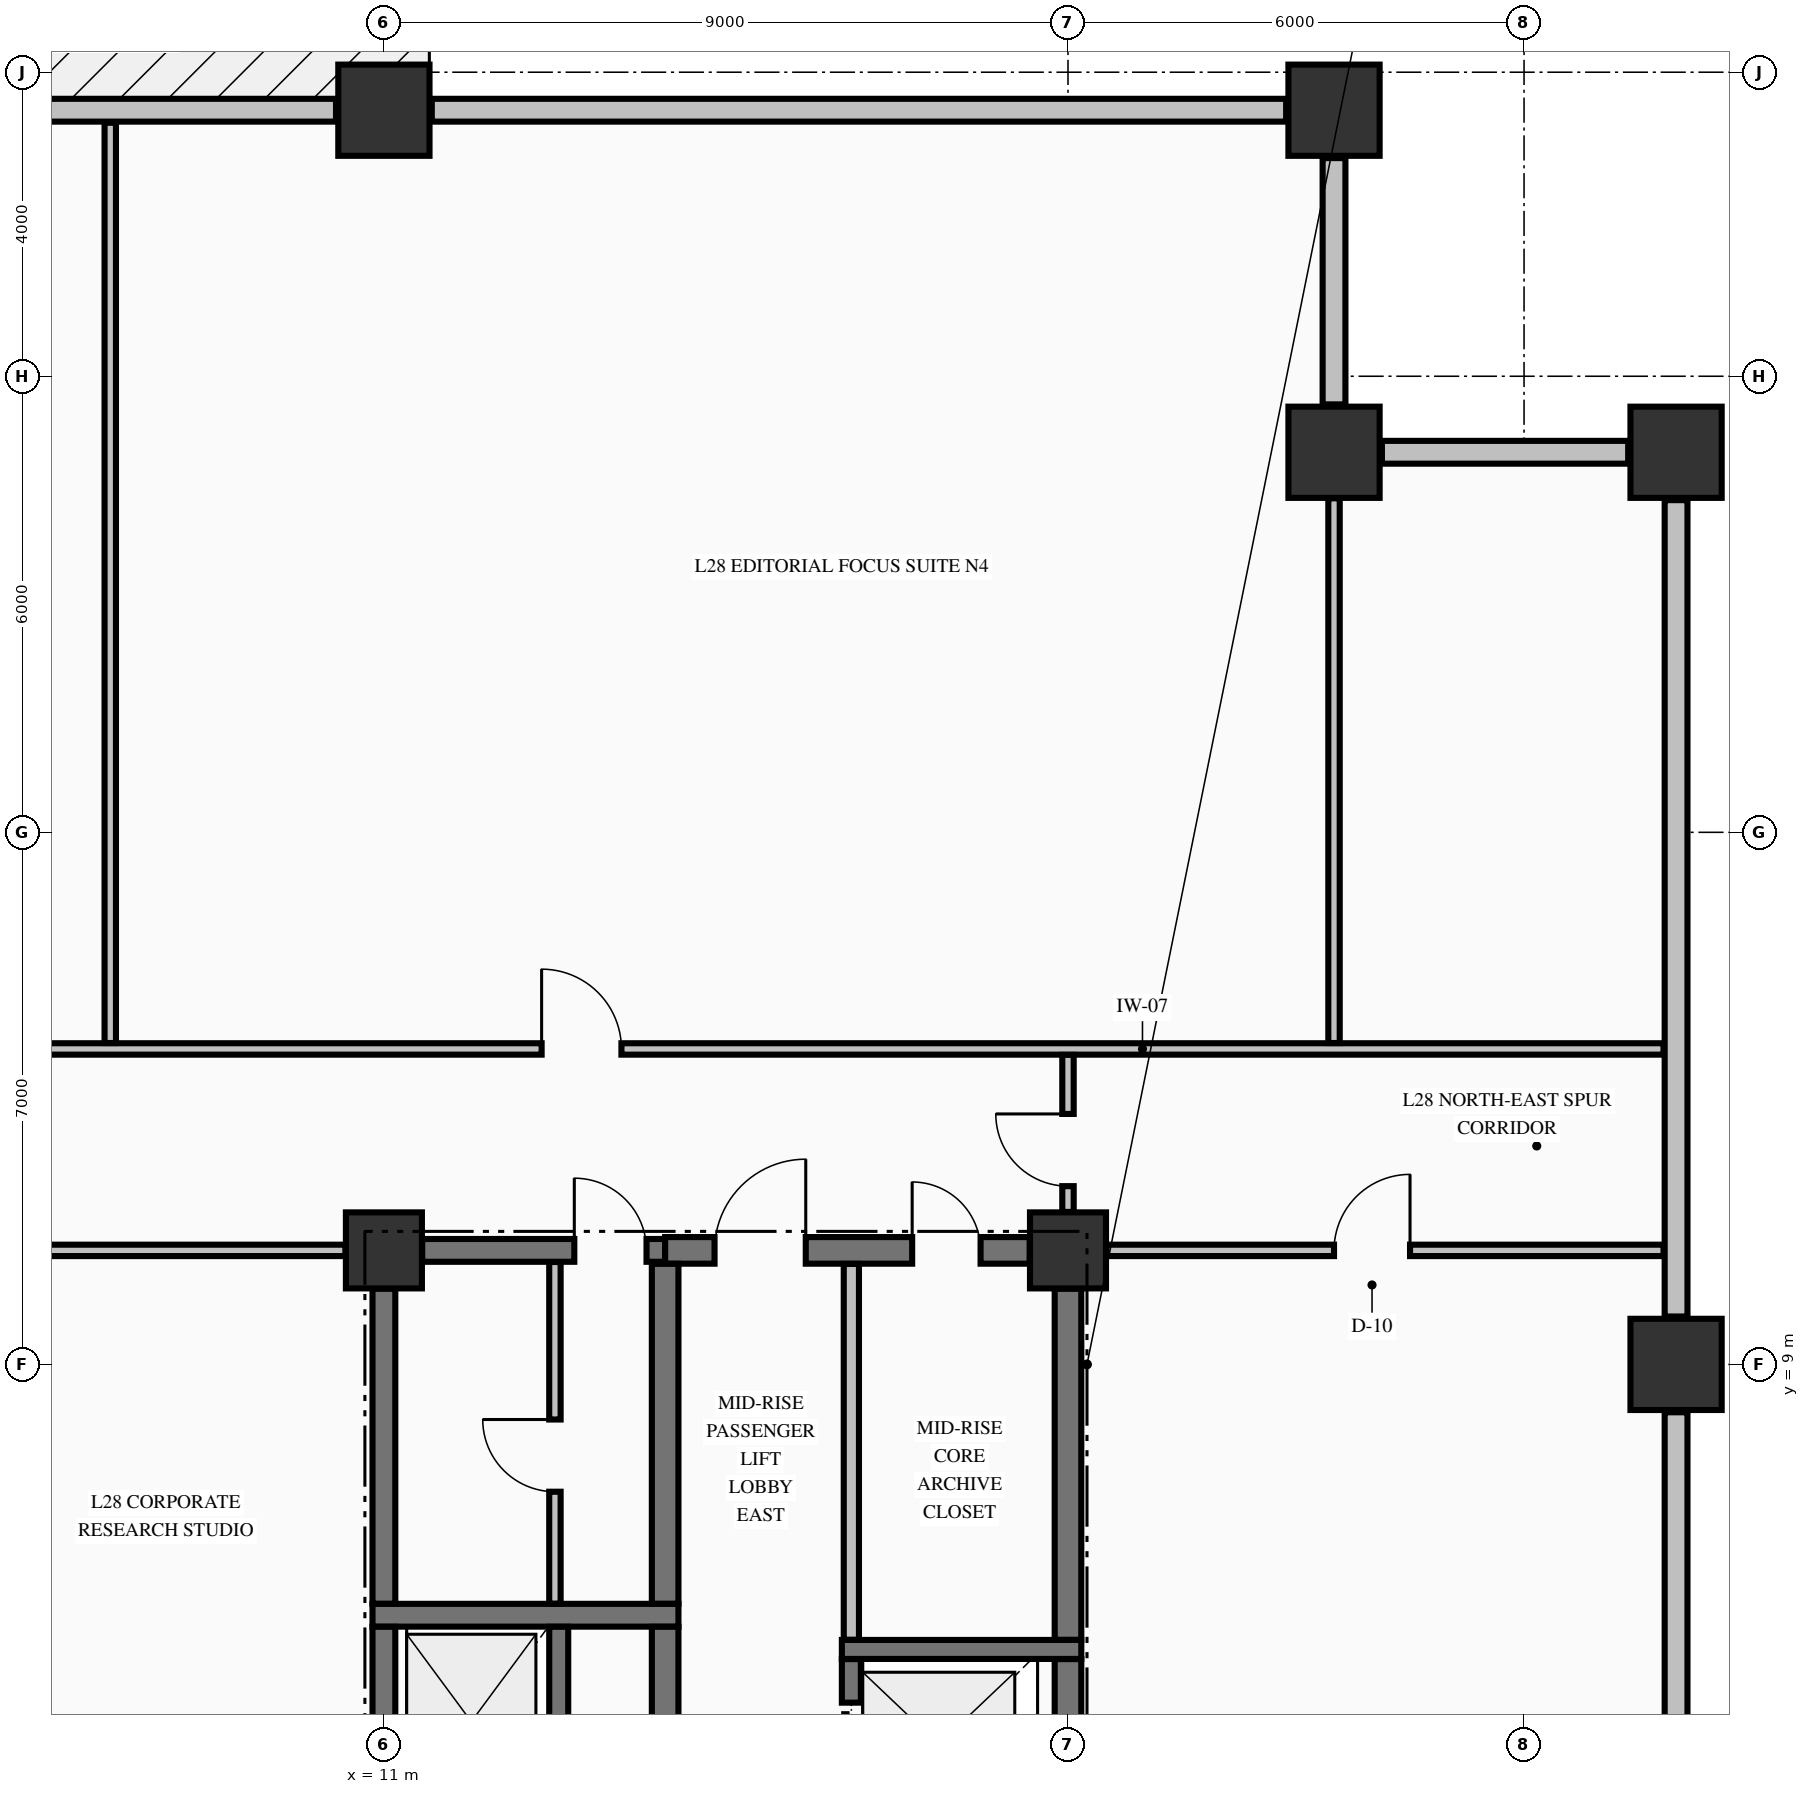
"""IFC4 building model, lengths in metres.
Left out: names, types, materials, properties, quantities, classifications, styles, units other than length and angle.
Written with IfcOpenShell. Run it as: python <this file> out.ifc"""

import sys

from ifc_helpers import new_model, si_unit, direction, frame, frame_2d, origin, origin_2d, place, context, subcontext, project, spatial, rectangle, extrude, element, fill, save


model = new_model("IFC4")
c1 = context("Model", 3, precision=1e-05, world=origin(), true_north=direction((0.0, 1.0)))
c2 = subcontext(c1, "Body", "Model", "MODEL_VIEW")
j1 = project(units=[si_unit("LENGTHUNIT", "METRE"), si_unit("PLANEANGLEUNIT", "RADIAN")], contexts=[c1])
p1 = place(None, origin())
s1 = spatial("IfcSite", under=j1, at=p1, CompositionType="ELEMENT")
p2 = place(p1, origin())
s2 = spatial("IfcBuilding", under=s1, at=p2, CompositionType="ELEMENT")
p3 = place(p2, frame((0.0, 0.0, 112.78)))
s3 = spatial("IfcBuildingStorey", under=s2, at=p3, CompositionType="ELEMENT", Elevation=112.78)
for number, where, z_axis, x_axis in (
    (1, (11.0, 25.5, -0.25), (0.0, 0.0, 1.0), (1.0, 0.0, 0.0)),
    (2, (23.5, 25.5, -0.25), (0.0, 0.0, 1.0), (1.0, 0.0, 0.0)),
    (3, (28.0, 9.0, -0.25), (0.0, 0.0, 1.0), (1.0, 0.0, 0.0)),
    (4, (28.0, 21.0, -0.25), (0.0, 0.0, 1.0), (1.0, 0.0, 0.0)),
    (5, (23.5, 21.0, -0.25), (0.0, 0.0, 1.0), (1.0, 0.0, 0.0)),
):
    element("IfcColumn", number, at=place(p3, frame(where, z_axis=z_axis, x_axis=x_axis)), inside=s3, PredefinedType="COLUMN", context=c2, shape_type="SweptSolid", body=[
        extrude(rectangle(XDim=1.2, YDim=1.2, at=origin_2d()), origin(), (0.0, 0.0, 1.0), 3.395),
    ])
for number, where, z_axis, x_axis in (
    (6, (11.0, 10.5, -0.25), (0.0, 0.0, 1.0), (1.0, 0.0, 0.0)),
    (7, (20.0, 10.5, -0.25), (0.0, 0.0, 1.0), (1.0, 0.0, 0.0)),
):
    element("IfcColumn", number, at=place(p3, frame(where, z_axis=z_axis, x_axis=x_axis)), inside=s3, PredefinedType="COLUMN", context=c2, shape_type="SweptSolid", body=[
        extrude(rectangle(XDim=1.0, YDim=1.0, at=origin_2d()), origin(), (0.0, 0.0, 1.0), 3.395),
    ])
for number, where, z_axis, x_axis in (
    (8, (27.37, 21.0, 0.0), (0.0, 0.0, 1.0), (-1.0, 0.0, 0.0)),
    (9, (23.5, 21.63, 0.0), (0.0, 0.0, 1.0), (0.0, 1.0, 0.0)),
):
    element("IfcWall", number, at=place(p3, frame(where, z_axis=z_axis, x_axis=x_axis)), inside=s3, PredefinedType="STANDARD", context=c2, shape_type="SweptSolid", body=[
        extrude(rectangle(XDim=3.24, YDim=0.3, at=frame_2d((1.62, 0.0))), origin(), (0.0, 0.0, 1.0), 2.537),
    ])
p4 = place(p3, frame((10.37, 25.5, 0.0), z_axis=(0.0, 0.0, 1.0), x_axis=(-1.0, 0.0, 0.0)))
e10 = element("IfcWall", 10, at=p4, inside=s3, PredefinedType="STANDARD", context=c2, shape_type="SweptSolid", body=[
    extrude(rectangle(XDim=9.74, YDim=0.3, at=frame_2d((4.87, 0.0))), origin(), (0.0, 0.0, 1.0), 2.537),
])
p5 = place(p3, frame((22.87, 25.5, 0.0), z_axis=(0.0, 0.0, 1.0), x_axis=(-1.0, 0.0, 0.0)))
e11 = element("IfcWall", 11, at=p5, inside=s3, PredefinedType="STANDARD", context=c2, shape_type="SweptSolid", body=[
    extrude(rectangle(XDim=11.24, YDim=0.3, at=frame_2d((5.62, 0.0))), origin(), (0.0, 0.0, 1.0), 2.537),
])
p6 = place(p3, frame((28.0, 0.63, 0.0), z_axis=(0.0, 0.0, 1.0), x_axis=(0.0, 1.0, 0.0)))
e12 = element("IfcWall", 12, at=p6, inside=s3, PredefinedType="STANDARD", context=c2, shape_type="SweptSolid", body=[
    extrude(rectangle(XDim=7.74, YDim=0.3, at=frame_2d((3.87, 0.0))), origin(), (0.0, 0.0, 1.0), 2.537),
])
p7 = place(p3, frame((28.0, 9.63, 0.0), z_axis=(0.0, 0.0, 1.0), x_axis=(0.0, 1.0, 0.0)))
e13 = element("IfcWall", 13, at=p7, inside=s3, PredefinedType="STANDARD", context=c2, shape_type="SweptSolid", body=[
    extrude(rectangle(XDim=10.74, YDim=0.3, at=frame_2d((5.37, 0.0))), origin(), (0.0, 0.0, 1.0), 2.537),
])
p8 = place(p3, frame((17.025, 5.25, 0.0), z_axis=(0.0, 0.0, 1.0), x_axis=(1.0, 0.0, 0.0)))
e14 = element("IfcWall", 14, at=p8, inside=s3, PredefinedType="SOLIDWALL", context=c2, shape_type="SweptSolid", body=[
    extrude(rectangle(XDim=3.15, YDim=0.25, at=frame_2d((1.575, 0.0))), origin(), (0.0, 0.0, 1.0), 3.145),
])
p9 = place(p3, frame((10.85, 5.7, 0.0), z_axis=(0.0, 0.0, 1.0), x_axis=(1.0, 0.0, 0.0)))
e15 = element("IfcWall", 15, at=p9, inside=s3, PredefinedType="SHEAR", context=c2, shape_type="SweptSolid", body=[
    extrude(rectangle(XDim=4.025, YDim=0.3, at=frame_2d((2.012, 0.0))), origin(), (0.0, 0.0, 1.0), 3.145),
])
p10 = place(p3, frame((11.504, 10.5, 0.0), z_axis=(0.0, 0.0, 1.0), x_axis=(1.0, 0.0, 0.0)))
e16 = element("IfcWall", 16, at=p10, inside=s3, PredefinedType="SHEAR", context=c2, shape_type="SweptSolid", body=[
    extrude(rectangle(XDim=3.196, YDim=0.3, at=frame_2d((1.598, 0.0))), origin(), (0.0, 0.0, 1.0), 3.145),
])
p11 = place(p10, frame((2.001, 0.0, 0.0)))
e17 = element("IfcOpeningElement", 17, at=p11, cuts=e16, PredefinedType="OPENING", context=c2, shape_type="SweptSolid", body=[
    extrude(rectangle(XDim=0.95, YDim=2.15, at=frame_2d((0.475, 1.075))), frame((0.0, 0.16, 0.0), z_axis=(0.0, -1.0, 0.0), x_axis=(1.0, 0.0, 0.0)), (0.0, 0.0, 1.0), 0.32),
])
p12 = place(p3, frame((14.7, 10.5, 0.0), z_axis=(0.0, 0.0, 1.0), x_axis=(1.0, 0.0, 0.0)))
e18 = element("IfcWall", 18, at=p12, inside=s3, PredefinedType="SHEAR", context=c2, shape_type="SweptSolid", body=[
    extrude(rectangle(XDim=4.796, YDim=0.35, at=frame_2d((2.398, 0.0))), origin(), (0.0, 0.0, 1.0), 3.145),
])
p13 = place(p12, frame((0.65, 0.0, 0.0)))
e19 = element("IfcOpeningElement", 19, at=p13, cuts=e18, PredefinedType="OPENING", context=c2, shape_type="SweptSolid", body=[
    extrude(rectangle(XDim=1.2, YDim=2.15, at=frame_2d((0.6, 1.075))), frame((0.0, 0.185, 0.0), z_axis=(0.0, -1.0, 0.0), x_axis=(1.0, 0.0, 0.0)), (0.0, 0.0, 1.0), 0.37),
])
p14 = place(p12, frame((3.25, 0.0, 0.0)))
e20 = element("IfcOpeningElement", 20, at=p14, cuts=e18, PredefinedType="OPENING", context=c2, shape_type="SweptSolid", body=[
    extrude(rectangle(XDim=0.9, YDim=2.15, at=frame_2d((0.45, 1.075))), frame((0.0, 0.185, 0.0), z_axis=(0.0, -1.0, 0.0), x_axis=(1.0, 0.0, 0.0)), (0.0, 0.0, 1.0), 0.37),
])
p15 = place(p3, frame((-10.494, 10.5, 0.0), z_axis=(0.0, 0.0, 1.0), x_axis=(1.0, 0.0, 0.0)))
e21 = element("IfcWall", 21, at=p15, inside=s3, PredefinedType="PARTITIONING", context=c2, shape_type="SweptSolid", body=[
    extrude(rectangle(XDim=20.988, YDim=0.15, at=frame_2d((10.494, 0.0))), origin(), (0.0, 0.0, 1.0), 3.145),
])
p16 = place(p15, frame((13.994, 0.0, 0.0)))
e22 = element("IfcOpeningElement", 22, at=p16, cuts=e21, PredefinedType="OPENING", context=c2, shape_type="SweptSolid", body=[
    extrude(rectangle(XDim=1.1, YDim=2.15, at=frame_2d((0.55, 1.075))), frame((0.0, 0.085, 0.0), z_axis=(0.0, -1.0, 0.0), x_axis=(1.0, 0.0, 0.0)), (0.0, 0.0, 1.0), 0.17),
])
p17 = place(p3, frame((20.506, 10.5, 0.0), z_axis=(0.0, 0.0, 1.0), x_axis=(1.0, 0.0, 0.0)))
e23 = element("IfcWall", 23, at=p17, inside=s3, PredefinedType="PARTITIONING", context=c2, shape_type="SweptSolid", body=[
    extrude(rectangle(XDim=7.329, YDim=0.15, at=frame_2d((3.665, 0.0))), origin(), (0.0, 0.0, 1.0), 3.145),
])
p18 = place(p17, frame((2.994, 0.0, 0.0)))
e24 = element("IfcOpeningElement", 24, at=p18, cuts=e23, PredefinedType="OPENING", context=c2, shape_type="SweptSolid", body=[
    extrude(rectangle(XDim=1.0, YDim=2.15, at=frame_2d((0.5, 1.075))), frame((0.0, 0.085, 0.0), z_axis=(0.0, -1.0, 0.0), x_axis=(1.0, 0.0, 0.0)), (0.0, 0.0, 1.0), 0.17),
])
p19 = place(p3, frame((-22.835, 13.15, 0.0), z_axis=(0.0, 0.0, 1.0), x_axis=(1.0, 0.0, 0.0)))
e25 = element("IfcWall", 25, at=p19, inside=s3, PredefinedType="PARTITIONING", context=c2, shape_type="SweptSolid", body=[
    extrude(rectangle(XDim=50.67, YDim=0.15, at=frame_2d((25.335, 0.0))), origin(), (0.0, 0.0, 1.0), 3.145),
])
p20 = place(p19, frame((7.01, 0.0, 0.0)))
e26 = element("IfcOpeningElement", 26, at=p20, cuts=e25, PredefinedType="OPENING", context=c2, shape_type="SweptSolid", body=[
    extrude(rectangle(XDim=0.95, YDim=2.15, at=frame_2d((0.475, 1.075))), frame((0.0, 0.085, 0.0), z_axis=(0.0, -1.0, 0.0), x_axis=(1.0, 0.0, 0.0)), (0.0, 0.0, 1.0), 0.17),
])
p21 = place(p19, frame((14.91, 0.0, 0.0)))
e27 = element("IfcOpeningElement", 27, at=p21, cuts=e25, PredefinedType="OPENING", context=c2, shape_type="SweptSolid", body=[
    extrude(rectangle(XDim=1.05, YDim=2.15, at=frame_2d((0.525, 1.075))), frame((0.0, 0.085, 0.0), z_axis=(0.0, -1.0, 0.0), x_axis=(1.0, 0.0, 0.0)), (0.0, 0.0, 1.0), 0.17),
])
p22 = place(p19, frame((24.71, 0.0, 0.0)))
e28 = element("IfcOpeningElement", 28, at=p22, cuts=e25, PredefinedType="OPENING", context=c2, shape_type="SweptSolid", body=[
    extrude(rectangle(XDim=1.05, YDim=2.15, at=frame_2d((0.525, 1.075))), frame((0.0, 0.085, 0.0), z_axis=(0.0, -1.0, 0.0), x_axis=(1.0, 0.0, 0.0)), (0.0, 0.0, 1.0), 0.17),
])
p23 = place(p19, frame((35.91, 0.0, 0.0)))
e29 = element("IfcOpeningElement", 29, at=p23, cuts=e25, PredefinedType="OPENING", context=c2, shape_type="SweptSolid", body=[
    extrude(rectangle(XDim=1.05, YDim=2.15, at=frame_2d((0.525, 1.075))), frame((0.0, 0.085, 0.0), z_axis=(0.0, -1.0, 0.0), x_axis=(1.0, 0.0, 0.0)), (0.0, 0.0, 1.0), 0.17),
])
p24 = place(p3, frame((11.0, 3.052, 0.0), z_axis=(0.0, 0.0, 1.0), x_axis=(0.0, 1.0, 0.0)))
e30 = element("IfcWall", 30, at=p24, inside=s3, PredefinedType="SHEAR", context=c2, shape_type="SweptSolid", body=[
    extrude(rectangle(XDim=2.496, YDim=0.3, at=frame_2d((1.248, 0.0))), origin(), (0.0, 0.0, 1.0), 3.145),
])
p25 = place(p3, frame((11.0, 5.852, 0.0), z_axis=(0.0, 0.0, 1.0), x_axis=(0.0, 1.0, 0.0)))
e31 = element("IfcWall", 31, at=p25, inside=s3, PredefinedType="SHEAR", context=c2, shape_type="SweptSolid", body=[
    extrude(rectangle(XDim=4.144, YDim=0.3, at=frame_2d((2.072, 0.0))), origin(), (0.0, 0.0, 1.0), 3.145),
])
p26 = place(p3, frame((13.3, 3.052, 0.0), z_axis=(0.0, 0.0, 1.0), x_axis=(0.0, 1.0, 0.0)))
e32 = element("IfcWall", 32, at=p26, inside=s3, PredefinedType="SOLIDWALL", context=c2, shape_type="SweptSolid", body=[
    extrude(rectangle(XDim=2.496, YDim=0.25, at=frame_2d((1.248, 0.0))), origin(), (0.0, 0.0, 1.0), 3.145),
])
p27 = place(p3, frame((14.7, 3.052, 0.0), z_axis=(0.0, 0.0, 1.0), x_axis=(0.0, 1.0, 0.0)))
e33 = element("IfcWall", 33, at=p27, inside=s3, PredefinedType="SHEAR", context=c2, shape_type="SweptSolid", body=[
    extrude(rectangle(XDim=2.496, YDim=0.35, at=frame_2d((1.248, 0.0))), origin(), (0.0, 0.0, 1.0), 3.145),
])
p28 = place(p3, frame((14.7, 5.852, 0.0), z_axis=(0.0, 0.0, 1.0), x_axis=(0.0, 1.0, 0.0)))
e34 = element("IfcWall", 34, at=p28, inside=s3, PredefinedType="SHEAR", context=c2, shape_type="SweptSolid", body=[
    extrude(rectangle(XDim=4.471, YDim=0.35, at=frame_2d((2.235, 0.0))), origin(), (0.0, 0.0, 1.0), 3.145),
])
p29 = place(p3, frame((17.15, 2.877, 0.0), z_axis=(0.0, 0.0, 1.0), x_axis=(0.0, 1.0, 0.0)))
e35 = element("IfcWall", 35, at=p29, inside=s3, PredefinedType="SOLIDWALL", context=c2, shape_type="SweptSolid", body=[
    extrude(rectangle(XDim=2.246, YDim=0.25, at=frame_2d((1.123, 0.0))), origin(), (0.0, 0.0, 1.0), 3.145),
])
p30 = place(p29, frame((0.573, 0.0, 0.0)))
e36 = element("IfcOpeningElement", 36, at=p30, cuts=e35, PredefinedType="OPENING", context=c2, shape_type="SweptSolid", body=[
    extrude(rectangle(XDim=1.1, YDim=2.2, at=frame_2d((0.55, 1.1))), frame((0.0, 0.135, 0.0), z_axis=(0.0, -1.0, 0.0), x_axis=(1.0, 0.0, 0.0)), (0.0, 0.0, 1.0), 0.27),
])
p31 = place(p3, frame((20.0, 2.877, 0.0), z_axis=(0.0, 0.0, 1.0), x_axis=(0.0, 1.0, 0.0)))
e37 = element("IfcWall", 37, at=p31, inside=s3, PredefinedType="SHEAR", context=c2, shape_type="SweptSolid", body=[
    extrude(rectangle(XDim=2.246, YDim=0.35, at=frame_2d((1.123, 0.0))), origin(), (0.0, 0.0, 1.0), 3.145),
])
p32 = place(p3, frame((20.0, 5.377, 0.0), z_axis=(0.0, 0.0, 1.0), x_axis=(0.0, 1.0, 0.0)))
e38 = element("IfcWall", 38, at=p32, inside=s3, PredefinedType="SHEAR", context=c2, shape_type="SweptSolid", body=[
    extrude(rectangle(XDim=4.619, YDim=0.35, at=frame_2d((2.31, 0.0))), origin(), (0.0, 0.0, 1.0), 3.145),
])
p33 = place(p3, frame((7.4, 13.228, 0.0), z_axis=(0.0, 0.0, 1.0), x_axis=(0.0, 1.0, 0.0)))
e39 = element("IfcWall", 39, at=p33, inside=s3, PredefinedType="PARTITIONING", context=c2, shape_type="SweptSolid", body=[
    extrude(rectangle(XDim=12.107, YDim=0.15, at=frame_2d((6.053, 0.0))), origin(), (0.0, 0.0, 1.0), 3.145),
])
p34 = place(p3, frame((13.25, 5.853, 0.0), z_axis=(0.0, 0.0, 1.0), x_axis=(0.0, 1.0, 0.0)))
e40 = element("IfcWall", 40, at=p34, inside=s3, PredefinedType="PARTITIONING", context=c2, shape_type="SweptSolid", body=[
    extrude(rectangle(XDim=4.494, YDim=0.15, at=frame_2d((2.247, 0.0))), origin(), (0.0, 0.0, 1.0), 3.145),
])
p35 = place(p34, frame((1.472, 0.0, 0.0)))
e41 = element("IfcOpeningElement", 41, at=p35, cuts=e40, PredefinedType="OPENING", context=c2, shape_type="SweptSolid", body=[
    extrude(rectangle(XDim=0.95, YDim=2.15, at=frame_2d((0.475, 1.075))), frame((0.0, 0.085, 0.0), z_axis=(0.0, -1.0, 0.0), x_axis=(1.0, 0.0, 0.0)), (0.0, 0.0, 1.0), 0.17),
])
p36 = place(p3, frame((17.15, 5.378, 0.0), z_axis=(0.0, 0.0, 1.0), x_axis=(0.0, 1.0, 0.0)))
e42 = element("IfcWall", 42, at=p36, inside=s3, PredefinedType="PARTITIONING", context=c2, shape_type="SweptSolid", body=[
    extrude(rectangle(XDim=4.944, YDim=0.2, at=frame_2d((2.472, 0.0))), origin(), (0.0, 0.0, 1.0), 3.145),
])
p37 = place(p3, frame((20.0, 11.006, 0.0), z_axis=(0.0, 0.0, 1.0), x_axis=(0.0, 1.0, 0.0)))
e43 = element("IfcWall", 43, at=p37, inside=s3, PredefinedType="PARTITIONING", context=c2, shape_type="SweptSolid", body=[
    extrude(rectangle(XDim=2.066, YDim=0.15, at=frame_2d((1.033, 0.0))), origin(), (0.0, 0.0, 1.0), 2.635),
])
p38 = place(p37, frame((0.339, 0.0, 0.0)))
e44 = element("IfcOpeningElement", 44, at=p38, cuts=e43, PredefinedType="OPENING", context=c2, shape_type="SweptSolid", body=[
    extrude(rectangle(XDim=0.95, YDim=2.15, at=frame_2d((0.475, 1.075))), frame((0.0, 0.085, 0.0), z_axis=(0.0, -1.0, 0.0), x_axis=(1.0, 0.0, 0.0)), (0.0, 0.0, 1.0), 0.17),
])
p39 = place(p3, frame((23.5, 13.228, 0.0), z_axis=(0.0, 0.0, 1.0), x_axis=(0.0, 1.0, 0.0)))
e45 = element("IfcWall", 45, at=p39, inside=s3, PredefinedType="PARTITIONING", context=c2, shape_type="SweptSolid", body=[
    extrude(rectangle(XDim=7.166, YDim=0.15, at=frame_2d((3.583, 0.0))), origin(), (0.0, 0.0, 1.0), 3.145),
])
p40 = place(p11, origin())
e46 = element("IfcDoor", 46, at=p40, inside=s3, OperationType="SINGLE_SWING_LEFT", PredefinedType="DOOR", context=c2, shape_type="SweptSolid", body=[
    extrude(rectangle(XDim=0.95, YDim=2.15, at=frame_2d((0.475, 1.075))), frame((0.0, 0.025, 0.0), z_axis=(0.0, -1.0, 0.0), x_axis=(1.0, 0.0, 0.0)), (0.0, 0.0, 1.0), 0.05),
])
fill(e17, e46)
p41 = place(p35, origin())
e47 = element("IfcDoor", 47, at=p41, inside=s3, OperationType="SINGLE_SWING_RIGHT", PredefinedType="DOOR", context=c2, shape_type="SweptSolid", body=[
    extrude(rectangle(XDim=0.95, YDim=2.15, at=frame_2d((0.475, 1.075))), frame((0.0, 0.025, 0.0), z_axis=(0.0, -1.0, 0.0), x_axis=(1.0, 0.0, 0.0)), (0.0, 0.0, 1.0), 0.05),
])
fill(e41, e47)
p42 = place(p30, origin())
e48 = element("IfcDoor", 48, at=p42, inside=s3, OperationType="SLIDING_TO_RIGHT", PredefinedType="DOOR", context=c2, shape_type="SweptSolid", body=[
    extrude(rectangle(XDim=1.1, YDim=2.2, at=frame_2d((0.55, 1.1))), frame((0.0, 0.025, 0.0), z_axis=(0.0, -1.0, 0.0), x_axis=(1.0, 0.0, 0.0)), (0.0, 0.0, 1.0), 0.05),
])
fill(e36, e48)
p43 = place(p13, origin())
e49 = element("IfcDoor", 49, at=p43, inside=s3, OperationType="SINGLE_SWING_RIGHT", PredefinedType="DOOR", context=c2, shape_type="SweptSolid", body=[
    extrude(rectangle(XDim=1.2, YDim=2.15, at=frame_2d((0.6, 1.075))), frame((0.0, 0.025, 0.0), z_axis=(0.0, -1.0, 0.0), x_axis=(1.0, 0.0, 0.0)), (0.0, 0.0, 1.0), 0.05),
])
fill(e19, e49)
p44 = place(p14, origin())
e50 = element("IfcDoor", 50, at=p44, inside=s3, OperationType="SINGLE_SWING_LEFT", PredefinedType="DOOR", context=c2, shape_type="SweptSolid", body=[
    extrude(rectangle(XDim=0.9, YDim=2.15, at=frame_2d((0.45, 1.075))), frame((0.0, 0.025, 0.0), z_axis=(0.0, -1.0, 0.0), x_axis=(1.0, 0.0, 0.0)), (0.0, 0.0, 1.0), 0.05),
])
fill(e20, e50)
p45 = place(p23, origin())
e51 = element("IfcDoor", 51, at=p45, inside=s3, OperationType="SINGLE_SWING_LEFT", PredefinedType="DOOR", context=c2, shape_type="SweptSolid", body=[
    extrude(rectangle(XDim=1.05, YDim=2.15, at=frame_2d((0.525, 1.075))), frame((0.0, 0.025, 0.0), z_axis=(0.0, -1.0, 0.0), x_axis=(1.0, 0.0, 0.0)), (0.0, 0.0, 1.0), 0.05),
])
fill(e29, e51)
p46 = place(p38, origin())
e52 = element("IfcDoor", 52, at=p46, inside=s3, OperationType="SINGLE_SWING_RIGHT", PredefinedType="DOOR", context=c2, shape_type="SweptSolid", body=[
    extrude(rectangle(XDim=0.95, YDim=2.15, at=frame_2d((0.475, 1.075))), frame((0.0, 0.025, 0.0), z_axis=(0.0, -1.0, 0.0), x_axis=(1.0, 0.0, 0.0)), (0.0, 0.0, 1.0), 0.05),
])
fill(e44, e52)
p47 = place(p18, origin())
e53 = element("IfcDoor", 53, at=p47, inside=s3, OperationType="SINGLE_SWING_RIGHT", PredefinedType="DOOR", context=c2, shape_type="SweptSolid", body=[
    extrude(rectangle(XDim=1.0, YDim=2.15, at=frame_2d((0.5, 1.075))), frame((0.0, 0.025, 0.0), z_axis=(0.0, -1.0, 0.0), x_axis=(1.0, 0.0, 0.0)), (0.0, 0.0, 1.0), 0.05),
])
fill(e24, e53)
save(model, sys.argv[1])
